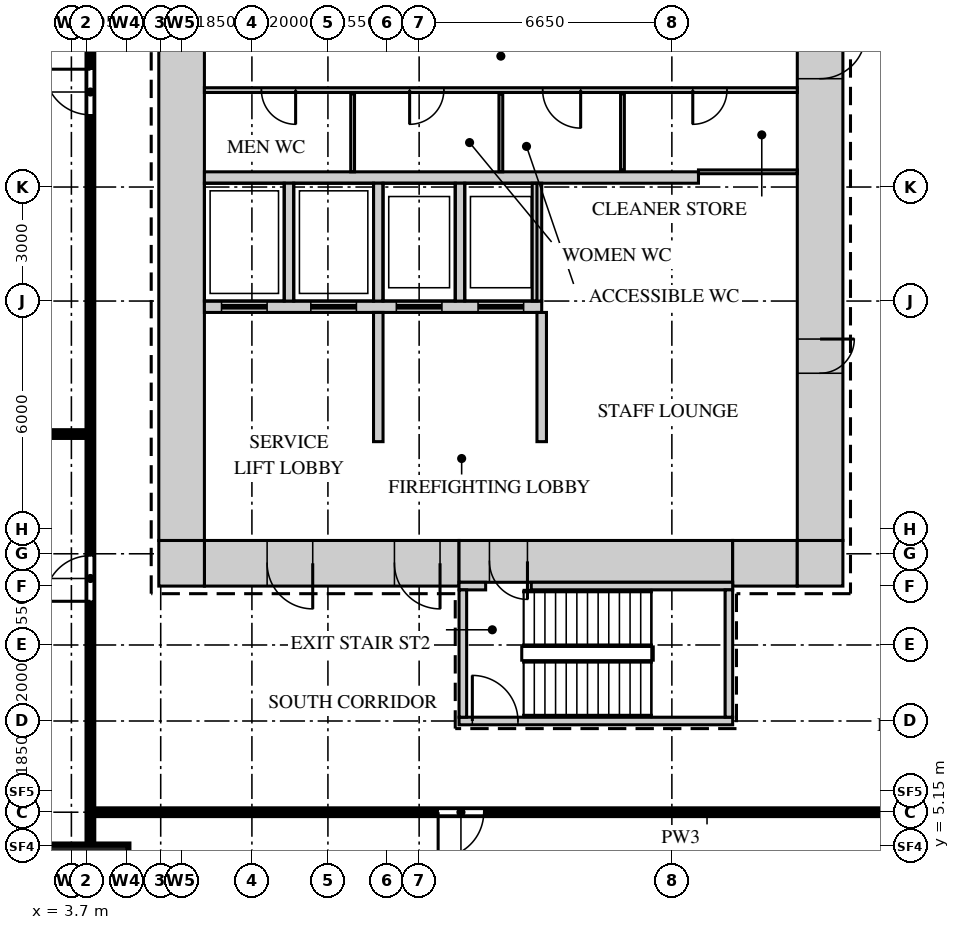
"""IFC4 building model, lengths in metres.
Left out: names, types, materials, properties, quantities, classifications, styles, units other than length and angle.
Written with IfcOpenShell. Run it as: python <this file> out.ifc"""

import sys

from ifc_helpers import new_model, si_unit, direction, frame, frame_2d, origin, origin_2d, place, context, subcontext, project, spatial, rectangle, extrude, source, transform, mapped, element, fill, save


model = new_model("IFC4")
c1 = context("Model", 3, precision=1e-05, world=origin(), true_north=direction((0.0, 1.0)))
c2 = subcontext(c1, "Body", "Model", "MODEL_VIEW")
j1 = project(units=[si_unit("LENGTHUNIT", "METRE"), si_unit("PLANEANGLEUNIT", "RADIAN")], contexts=[c1])
p1 = place(None, origin())
s1 = spatial("IfcSite", under=j1, at=p1, CompositionType="ELEMENT")
p2 = place(p1, origin())
s2 = spatial("IfcBuilding", under=s1, at=p2, CompositionType="ELEMENT")
p3 = place(p2, frame((0.0, 0.0, -9.0)))
s3 = spatial("IfcBuildingStorey", under=s2, at=p3, CompositionType="ELEMENT", Elevation=-9.0)
m1 = source(origin(), c2, "Body", "SweptSolid", [
    extrude(rectangle(XDim=6.7, YDim=1.2, at=frame_2d((3.35, 0.0))), origin(), (0.0, 0.0, 1.0), 4.2),
])
p4 = place(p3, frame((7.2, 12.6, 0.0), z_axis=(0.0, 0.0, 1.0), x_axis=(1.0, 0.0, 0.0)))
e1 = element("IfcWall", 1, at=p4, inside=s3, PredefinedType="SHEAR", context=c2, shape_type="MappedRepresentation", body=[
    mapped(m1, transform((0.0, 0.0, 0.0))),
])
m2 = source(origin(), c2, "Body", "SweptSolid", [
    extrude(rectangle(XDim=1.2, YDim=2.1, at=frame_2d((0.6, 1.05))), frame((0.0, 0.61, 0.0), z_axis=(0.0, -1.0, 0.0), x_axis=(1.0, 0.0, 0.0)), (0.0, 0.0, 1.0), 1.22),
])
p5 = place(p4, frame((5.0, 0.0, 0.0)))
e2 = element("IfcOpeningElement", 2, at=p5, cuts=e1, PredefinedType="OPENING", context=c2, shape_type="MappedRepresentation", body=[
    mapped(m2, transform((0.0, 0.0, 0.0))),
])
p6 = place(p4, frame((1.65, 0.0, 0.0)))
e3 = element("IfcOpeningElement", 3, at=p6, cuts=e1, PredefinedType="OPENING", context=c2, shape_type="MappedRepresentation", body=[
    mapped(m2, transform((0.0, 0.0, 0.0))),
])
m3 = source(origin(), c2, "Body", "SweptSolid", [
    extrude(rectangle(XDim=7.2, YDim=1.1, at=frame_2d((3.6, 0.0))), origin(), (0.0, 0.0, 1.0), 4.2),
])
p7 = place(p3, frame((13.9, 12.65, 0.0), z_axis=(0.0, 0.0, 1.0), x_axis=(1.0, 0.0, 0.0)))
e4 = element("IfcWall", 4, at=p7, inside=s3, PredefinedType="SHEAR", context=c2, shape_type="MappedRepresentation", body=[
    mapped(m3, transform((0.0, 0.0, 0.0))),
])
m4 = source(origin(), c2, "Body", "SweptSolid", [
    extrude(rectangle(XDim=1.0, YDim=2.1, at=frame_2d((0.5, 1.05))), frame((0.0, 0.56, 0.0), z_axis=(0.0, -1.0, 0.0), x_axis=(1.0, 0.0, 0.0)), (0.0, 0.0, 1.0), 1.12),
])
p8 = place(p7, frame((0.8, 0.0, 0.0)))
e5 = element("IfcOpeningElement", 5, at=p8, cuts=e4, PredefinedType="OPENING", context=c2, shape_type="MappedRepresentation", body=[
    mapped(m4, transform((0.0, 0.0, 0.0))),
])
m5 = source(origin(), c2, "Body", "SweptSolid", [
    extrude(rectangle(XDim=1.7, YDim=1.2, at=frame_2d((0.85, 0.0))), origin(), (0.0, 0.0, 1.0), 4.2),
])
p9 = place(p3, frame((21.1, 12.6, 0.0), z_axis=(0.0, 0.0, 1.0), x_axis=(1.0, 0.0, 0.0)))
e6 = element("IfcWall", 6, at=p9, inside=s3, PredefinedType="SHEAR", context=c2, shape_type="MappedRepresentation", body=[
    mapped(m5, transform((0.0, 0.0, 0.0))),
])
m6 = source(origin(), c2, "Body", "SweptSolid", [
    extrude(rectangle(XDim=1.2, YDim=1.2, at=frame_2d((0.6, 0.0))), origin(), (0.0, 0.0, 1.0), 4.2),
])
for number, where, z_axis, x_axis in (
    (7, (22.8, 12.6, 0.0), (0.0, 0.0, 1.0), (1.0, 0.0, 0.0)),
    (8, (6.0, 12.6, 0.0), (0.0, 0.0, 1.0), (1.0, 0.0, 0.0)),
):
    element("IfcWall", number, at=place(p3, frame(where, z_axis=z_axis, x_axis=x_axis)), inside=s3, PredefinedType="SHEAR", context=c2, shape_type="MappedRepresentation", body=[
        mapped(m6, transform((0.0, 0.0, 0.0))),
    ])
m7 = source(origin(), c2, "Body", "SweptSolid", [
    extrude(rectangle(XDim=27.6, YDim=1.2, at=frame_2d((13.8, 0.0))), origin(), (0.0, 0.0, 1.0), 4.2),
])
p10 = place(p3, frame((23.4, 13.2, 0.0), z_axis=(0.0, 0.0, 1.0), x_axis=(0.0, 1.0, 0.0)))
e9 = element("IfcWall", 9, at=p10, inside=s3, PredefinedType="SHEAR", context=c2, shape_type="MappedRepresentation", body=[
    mapped(m7, transform((0.0, 0.0, 0.0))),
])
p11 = place(p10, frame((12.15, 0.0, 0.0)))
e10 = element("IfcOpeningElement", 10, at=p11, cuts=e9, PredefinedType="OPENING", context=c2, shape_type="MappedRepresentation", body=[
    mapped(m2, transform((0.0, 0.0, 0.0))),
])
m8 = source(origin(), c2, "Body", "SweptSolid", [
    extrude(rectangle(XDim=0.9, YDim=2.1, at=frame_2d((0.45, 1.05))), frame((0.0, 0.61, 0.0), z_axis=(0.0, -1.0, 0.0), x_axis=(1.0, 0.0, 0.0)), (0.0, 0.0, 1.0), 1.22),
])
p12 = place(p10, frame((4.4, 0.0, 0.0)))
e11 = element("IfcOpeningElement", 11, at=p12, cuts=e9, PredefinedType="OPENING", context=c2, shape_type="MappedRepresentation", body=[
    mapped(m8, transform((0.0, 0.0, 0.0))),
])
p13 = place(p3, frame((6.6, 13.2, 0.0), z_axis=(0.0, 0.0, 1.0), x_axis=(0.0, 1.0, 0.0)))
e12 = element("IfcWall", 12, at=p13, inside=s3, PredefinedType="SHEAR", context=c2, shape_type="MappedRepresentation", body=[
    mapped(m7, transform((0.0, 0.0, 0.0))),
])
m9 = source(origin(), c2, "Body", "SweptSolid", [
    extrude(rectangle(XDim=0.7, YDim=0.2, at=frame_2d((0.35, 0.0))), origin(), (0.0, 0.0, 1.0), 4.2),
])
p14 = place(p3, frame((13.9, 12.0, 0.0), z_axis=(0.0, 0.0, 1.0), x_axis=(1.0, 0.0, 0.0)))
e13 = element("IfcWall", 13, at=p14, inside=s3, PredefinedType="SHEAR", context=c2, shape_type="MappedRepresentation", body=[
    mapped(m9, transform((0.0, 0.0, 0.0))),
])
m10 = source(origin(), c2, "Body", "SweptSolid", [
    extrude(rectangle(XDim=5.3, YDim=0.2, at=frame_2d((2.65, 0.0))), origin(), (0.0, 0.0, 1.0), 4.2),
])
p15 = place(p3, frame((15.8, 12.0, 0.0), z_axis=(0.0, 0.0, 1.0), x_axis=(1.0, 0.0, 0.0)))
e14 = element("IfcWall", 14, at=p15, inside=s3, PredefinedType="SHEAR", context=c2, shape_type="MappedRepresentation", body=[
    mapped(m10, transform((0.0, 0.0, 0.0))),
])
m11 = source(origin(), c2, "Body", "SweptSolid", [
    extrude(rectangle(XDim=7.2, YDim=0.2, at=frame_2d((3.6, 0.0))), origin(), (0.0, 0.0, 1.0), 4.2),
])
p16 = place(p3, frame((13.9, 8.45, 0.0), z_axis=(0.0, 0.0, 1.0), x_axis=(1.0, 0.0, 0.0)))
e15 = element("IfcWall", 15, at=p16, inside=s3, PredefinedType="SHEAR", context=c2, shape_type="MappedRepresentation", body=[
    mapped(m11, transform((0.0, 0.0, 0.0))),
])
m12 = source(origin(), c2, "Body", "SweptSolid", [
    extrude(rectangle(XDim=1.2, YDim=2.1, at=frame_2d((0.6, 1.05))), frame((0.0, 0.11, 0.0), z_axis=(0.0, -1.0, 0.0), x_axis=(1.0, 0.0, 0.0)), (0.0, 0.0, 1.0), 0.22),
])
p17 = place(p16, frame((0.35, 0.0, 0.0)))
e16 = element("IfcOpeningElement", 16, at=p17, cuts=e15, PredefinedType="OPENING", context=c2, shape_type="MappedRepresentation", body=[
    mapped(m12, transform((0.0, 0.0, 0.0))),
])
m13 = source(origin(), c2, "Body", "SweptSolid", [
    extrude(rectangle(XDim=3.35, YDim=0.2, at=frame_2d((1.675, 0.0))), origin(), (0.0, 0.0, 1.0), 4.2),
])
for number, where, z_axis, x_axis in (
    (17, (21.0, 8.55, 0.0), (0.0, 0.0, 1.0), (0.0, 1.0, 0.0)),
    (18, (14.0, 8.55, 0.0), (0.0, 0.0, 1.0), (0.0, 1.0, 0.0)),
):
    element("IfcWall", number, at=place(p3, frame(where, z_axis=z_axis, x_axis=x_axis)), inside=s3, PredefinedType="SHEAR", context=c2, shape_type="MappedRepresentation", body=[
        mapped(m13, transform((0.0, 0.0, 0.0))),
    ])
m14 = source(origin(), c2, "Body", "SweptSolid", [
    extrude(rectangle(XDim=13.0, YDim=0.3, at=frame_2d((6.5, 0.0))), origin(), (0.0, 0.0, 1.0), 4.2),
])
p18 = place(p3, frame((7.2, 22.75, 0.0), z_axis=(0.0, 0.0, 1.0), x_axis=(1.0, 0.0, 0.0)))
e19 = element("IfcWall", 19, at=p18, inside=s3, PredefinedType="STANDARD", context=c2, shape_type="MappedRepresentation", body=[
    mapped(m14, transform((0.0, 0.0, 0.0))),
])
m15 = source(origin(), c2, "Body", "SweptSolid", [
    extrude(rectangle(XDim=8.875, YDim=0.3, at=frame_2d((4.438, 0.0))), origin(), (0.0, 0.0, 1.0), 4.2),
])
p19 = place(p3, frame((7.2, 19.35, 0.0), z_axis=(0.0, 0.0, 1.0), x_axis=(1.0, 0.0, 0.0)))
e20 = element("IfcWall", 20, at=p19, inside=s3, PredefinedType="STANDARD", context=c2, shape_type="MappedRepresentation", body=[
    mapped(m15, transform((0.0, 0.0, 0.0))),
])
m16 = source(origin(), c2, "Body", "SweptSolid", [
    extrude(rectangle(XDim=1.2, YDim=2.1, at=frame_2d((0.6, 1.05))), frame((0.0, 0.16, 0.0), z_axis=(0.0, -1.0, 0.0), x_axis=(1.0, 0.0, 0.0)), (0.0, 0.0, 1.0), 0.32),
])
p20 = place(p19, frame((0.45, 0.0, 0.0)))
e21 = element("IfcOpeningElement", 21, at=p20, cuts=e20, PredefinedType="OPENING", context=c2, shape_type="MappedRepresentation", body=[
    mapped(m16, transform((0.0, 0.0, 0.0))),
])
p21 = place(p19, frame((2.8, 0.0, 0.0)))
e22 = element("IfcOpeningElement", 22, at=p21, cuts=e20, PredefinedType="OPENING", context=c2, shape_type="MappedRepresentation", body=[
    mapped(m16, transform((0.0, 0.0, 0.0))),
])
p22 = place(p19, frame((5.05, 0.0, 0.0)))
e23 = element("IfcOpeningElement", 23, at=p22, cuts=e20, PredefinedType="OPENING", context=c2, shape_type="MappedRepresentation", body=[
    mapped(m16, transform((0.0, 0.0, 0.0))),
])
p23 = place(p19, frame((7.2, 0.0, 0.0)))
e24 = element("IfcOpeningElement", 24, at=p23, cuts=e20, PredefinedType="OPENING", context=c2, shape_type="MappedRepresentation", body=[
    mapped(m16, transform((0.0, 0.0, 0.0))),
])
m17 = source(origin(), c2, "Body", "SweptSolid", [
    extrude(rectangle(XDim=3.1, YDim=0.25, at=frame_2d((1.55, 0.0))), origin(), (0.0, 0.0, 1.0), 4.2),
])
for number, where, z_axis, x_axis in (
    (25, (9.425, 19.5, 0.0), (0.0, 0.0, 1.0), (0.0, 1.0, 0.0)),
    (26, (11.775, 19.5, 0.0), (0.0, 0.0, 1.0), (0.0, 1.0, 0.0)),
    (27, (13.925, 19.5, 0.0), (0.0, 0.0, 1.0), (0.0, 1.0, 0.0)),
    (28, (15.95, 19.5, 0.0), (0.0, 0.0, 1.0), (0.0, 1.0, 0.0)),
):
    element("IfcWall", number, at=place(p3, frame(where, z_axis=z_axis, x_axis=x_axis)), inside=s3, PredefinedType="STANDARD", context=c2, shape_type="MappedRepresentation", body=[
        mapped(m17, transform((0.0, 0.0, 0.0))),
    ])
m18 = source(origin(), c2, "Body", "SweptSolid", [
    extrude(rectangle(XDim=3.4, YDim=0.25, at=frame_2d((1.7, 0.0))), origin(), (0.0, 0.0, 1.0), 4.2),
])
for number, where, z_axis, x_axis in (
    (29, (16.075, 15.8, 0.0), (0.0, 0.0, 1.0), (0.0, 1.0, 0.0)),
    (30, (11.775, 15.8, 0.0), (0.0, 0.0, 1.0), (0.0, 1.0, 0.0)),
):
    element("IfcWall", number, at=place(p3, frame(where, z_axis=z_axis, x_axis=x_axis)), inside=s3, PredefinedType="STANDARD", context=c2, shape_type="MappedRepresentation", body=[
        mapped(m18, transform((0.0, 0.0, 0.0))),
    ])
m19 = source(origin(), c2, "Body", "SweptSolid", [
    extrude(rectangle(XDim=2.2, YDim=2.2, at=origin_2d()), origin(), (0.0, 0.0, 1.0), 4.5),
])
p24 = place(p3, frame((4.1, 4.1, 0.0), z_axis=(0.0, 0.0, 1.0), x_axis=(1.0, 0.0, 0.0)))
e31 = element("IfcColumn", 31, at=p24, inside=s3, PredefinedType="COLUMN", context=c2, shape_type="MappedRepresentation", body=[
    mapped(m19, transform((0.0, 0.0, 0.0))),
])
m20 = source(origin(), c2, "Body", "SweptSolid", [
    extrude(rectangle(XDim=53.0, YDim=0.15, at=frame_2d((26.5, 0.0))), origin(), (0.0, 0.0, 1.0), 4.2),
])
p25 = place(p3, frame((4.2, 0.5, 0.0), z_axis=(0.0, 0.0, 1.0), x_axis=(0.0, 1.0, 0.0)))
e32 = element("IfcWall", 32, at=p25, inside=s3, PredefinedType="PARTITIONING", context=c2, shape_type="MappedRepresentation", body=[
    mapped(m20, transform((0.0, 0.0, 0.0))),
])
m21 = source(origin(), c2, "Body", "SweptSolid", [
    extrude(rectangle(XDim=1.2, YDim=2.1, at=frame_2d((0.6, 1.05))), frame((0.0, 0.085, 0.0), z_axis=(0.0, -1.0, 0.0), x_axis=(1.0, 0.0, 0.0)), (0.0, 0.0, 1.0), 0.17),
])
p26 = place(p25, frame((11.1, 0.0, 0.0)))
e33 = element("IfcOpeningElement", 33, at=p26, cuts=e32, PredefinedType="OPENING", context=c2, shape_type="MappedRepresentation", body=[
    mapped(m21, transform((0.0, 0.0, 0.0))),
])
p27 = place(p25, frame((23.9, 0.0, 0.0)))
e34 = element("IfcOpeningElement", 34, at=p27, cuts=e32, PredefinedType="OPENING", context=c2, shape_type="MappedRepresentation", body=[
    mapped(m21, transform((0.0, 0.0, 0.0))),
])
p28 = place(p25, frame((38.7, 0.0, 0.0)))
e35 = element("IfcOpeningElement", 35, at=p28, cuts=e32, PredefinedType="OPENING", context=c2, shape_type="MappedRepresentation", body=[
    mapped(m21, transform((0.0, 0.0, 0.0))),
])
m22 = source(origin(), c2, "Body", "SweptSolid", [
    extrude(rectangle(XDim=22.0, YDim=0.15, at=frame_2d((11.0, 0.0))), origin(), (0.0, 0.0, 1.0), 4.2),
])
p29 = place(p3, frame((4.3, 6.05, 0.0), z_axis=(0.0, 0.0, 1.0), x_axis=(1.0, 0.0, 0.0)))
e36 = element("IfcWall", 36, at=p29, inside=s3, PredefinedType="PARTITIONING", context=c2, shape_type="MappedRepresentation", body=[
    mapped(m22, transform((0.0, 0.0, 0.0))),
])
p30 = place(p29, frame((9.05, 0.0, 0.0)))
e37 = element("IfcOpeningElement", 37, at=p30, cuts=e36, PredefinedType="OPENING", context=c2, shape_type="MappedRepresentation", body=[
    mapped(m21, transform((0.0, 0.0, 0.0))),
])
m23 = source(origin(), c2, "Body", "SweptSolid", [
    extrude(rectangle(XDim=12.6, YDim=0.15, at=frame_2d((6.3, 0.0))), origin(), (0.0, 0.0, 1.0), 4.2),
])
p31 = place(p3, frame((-8.5, 16.0, 0.0), z_axis=(0.0, 0.0, 1.0), x_axis=(1.0, 0.0, 0.0)))
e38 = element("IfcWall", 38, at=p31, inside=s3, PredefinedType="PARTITIONING", context=c2, shape_type="MappedRepresentation", body=[
    mapped(m23, transform((0.0, 0.0, 0.0))),
])
m24 = source(origin(), c2, "Body", "SweptSolid", [
    extrude(rectangle(XDim=2.05, YDim=0.1, at=frame_2d((1.025, 0.0))), origin(), (0.0, 0.0, 1.0), 4.2),
])
for number, where, z_axis, x_axis in (
    (39, (11.1, 22.9, 0.0), (0.0, 0.0, 1.0), (0.0, 1.0, 0.0)),
    (40, (15.0, 22.9, 0.0), (0.0, 0.0, 1.0), (0.0, 1.0, 0.0)),
):
    element("IfcWall", number, at=place(p3, frame(where, z_axis=z_axis, x_axis=x_axis)), inside=s3, PredefinedType="PARTITIONING", context=c2, shape_type="MappedRepresentation", body=[
        mapped(m24, transform((0.0, 0.0, 0.0))),
    ])
m25 = source(origin(), c2, "Body", "SweptSolid", [
    extrude(rectangle(XDim=2.6, YDim=0.1, at=frame_2d((1.3, 0.0))), origin(), (0.0, 0.0, 1.0), 4.2),
])
p32 = place(p3, frame((20.2, 22.9, 0.0), z_axis=(0.0, 0.0, 1.0), x_axis=(1.0, 0.0, 0.0)))
e41 = element("IfcWall", 41, at=p32, inside=s3, PredefinedType="PARTITIONING", context=c2, shape_type="MappedRepresentation", body=[
    mapped(m25, transform((0.0, 0.0, 0.0))),
])
m26 = source(origin(), c2, "Body", "SweptSolid", [
    extrude(rectangle(XDim=2.0, YDim=0.1, at=frame_2d((1.0, 0.0))), origin(), (0.0, 0.0, 1.0), 4.2),
])
p33 = place(p3, frame((18.2, 22.95, 0.0), z_axis=(0.0, 0.0, 1.0), x_axis=(0.0, 1.0, 0.0)))
e42 = element("IfcWall", 42, at=p33, inside=s3, PredefinedType="PARTITIONING", context=c2, shape_type="MappedRepresentation", body=[
    mapped(m26, transform((0.0, 0.0, 0.0))),
])
m27 = source(origin(), c2, "Body", "SweptSolid", [
    extrude(rectangle(XDim=15.6, YDim=0.125, at=frame_2d((7.8, 0.0))), origin(), (0.0, 0.0, 1.0), 4.2),
])
p34 = place(p3, frame((7.2, 25.05, 0.0), z_axis=(0.0, 0.0, 1.0), x_axis=(1.0, 0.0, 0.0)))
e43 = element("IfcWall", 43, at=p34, inside=s3, PredefinedType="PARTITIONING", context=c2, shape_type="MappedRepresentation", body=[
    mapped(m27, transform((0.0, 0.0, 0.0))),
])
m28 = source(origin(), c2, "Body", "SweptSolid", [
    extrude(rectangle(XDim=0.9, YDim=2.1, at=frame_2d((0.45, 1.05))), frame((0.0, 0.073, 0.0), z_axis=(0.0, -1.0, 0.0), x_axis=(1.0, 0.0, 0.0)), (0.0, 0.0, 1.0), 0.145),
])
p35 = place(p34, frame((1.5, 0.0, 0.0)))
e44 = element("IfcOpeningElement", 44, at=p35, cuts=e43, PredefinedType="OPENING", context=c2, shape_type="MappedRepresentation", body=[
    mapped(m28, transform((0.0, 0.0, 0.0))),
])
p36 = place(p34, frame((5.4, 0.0, 0.0)))
e45 = element("IfcOpeningElement", 45, at=p36, cuts=e43, PredefinedType="OPENING", context=c2, shape_type="MappedRepresentation", body=[
    mapped(m28, transform((0.0, 0.0, 0.0))),
])
m29 = source(origin(), c2, "Body", "SweptSolid", [
    extrude(rectangle(XDim=1.0, YDim=2.1, at=frame_2d((0.5, 1.05))), frame((0.0, 0.073, 0.0), z_axis=(0.0, -1.0, 0.0), x_axis=(1.0, 0.0, 0.0)), (0.0, 0.0, 1.0), 0.145),
])
p37 = place(p34, frame((8.9, 0.0, 0.0)))
e46 = element("IfcOpeningElement", 46, at=p37, cuts=e43, PredefinedType="OPENING", context=c2, shape_type="MappedRepresentation", body=[
    mapped(m29, transform((0.0, 0.0, 0.0))),
])
p38 = place(p34, frame((12.85, 0.0, 0.0)))
e47 = element("IfcOpeningElement", 47, at=p38, cuts=e43, PredefinedType="OPENING", context=c2, shape_type="MappedRepresentation", body=[
    mapped(m28, transform((0.0, 0.0, 0.0))),
])
m30 = source(origin(), c2, "Body", "SweptSolid", [
    extrude(rectangle(XDim=1.2, YDim=2.1, at=frame_2d((0.6, 1.05))), frame((0.0, 0.55, 0.0), z_axis=(0.0, -1.0, 0.0), x_axis=(1.0, 0.0, 0.0)), (0.0, 0.0, 1.0), 1.1),
])
p39 = place(p11, origin())
e48 = element("IfcDoor", 48, at=p39, inside=s3, OperationType="SINGLE_SWING_RIGHT", PredefinedType="DOOR", context=c2, shape_type="MappedRepresentation", body=[
    mapped(m30, transform((0.0, 0.0, 0.0))),
])
fill(e10, e48)
m31 = source(origin(), c2, "Body", "SweptSolid", [
    extrude(rectangle(XDim=0.9, YDim=2.1, at=frame_2d((0.45, 1.05))), frame((0.0, 0.025, 0.0), z_axis=(0.0, -1.0, 0.0), x_axis=(1.0, 0.0, 0.0)), (0.0, 0.0, 1.0), 0.05),
])
p40 = place(p35, origin())
e49 = element("IfcDoor", 49, at=p40, inside=s3, OperationType="SINGLE_SWING_RIGHT", PredefinedType="DOOR", context=c2, shape_type="MappedRepresentation", body=[
    mapped(m31, transform((0.0, 0.0, 0.0))),
])
fill(e44, e49)
p41 = place(p36, origin())
e50 = element("IfcDoor", 50, at=p41, inside=s3, OperationType="SINGLE_SWING_LEFT", PredefinedType="DOOR", context=c2, shape_type="MappedRepresentation", body=[
    mapped(m31, transform((0.0, 0.0, 0.0))),
])
fill(e45, e50)
m32 = source(origin(), c2, "Body", "SweptSolid", [
    extrude(rectangle(XDim=1.0, YDim=2.1, at=frame_2d((0.5, 1.05))), frame((0.0, 0.025, 0.0), z_axis=(0.0, -1.0, 0.0), x_axis=(1.0, 0.0, 0.0)), (0.0, 0.0, 1.0), 0.05),
])
p42 = place(p37, origin())
e51 = element("IfcDoor", 51, at=p42, inside=s3, OperationType="SINGLE_SWING_RIGHT", PredefinedType="DOOR", context=c2, shape_type="MappedRepresentation", body=[
    mapped(m32, transform((0.0, 0.0, 0.0))),
])
fill(e46, e51)
p43 = place(p38, origin())
e52 = element("IfcDoor", 52, at=p43, inside=s3, OperationType="SINGLE_SWING_LEFT", PredefinedType="DOOR", context=c2, shape_type="MappedRepresentation", body=[
    mapped(m31, transform((0.0, 0.0, 0.0))),
])
fill(e47, e52)
m33 = source(origin(), c2, "Body", "SweptSolid", [
    extrude(rectangle(XDim=0.9, YDim=2.1, at=frame_2d((0.45, 1.05))), frame((0.0, 0.55, 0.0), z_axis=(0.0, -1.0, 0.0), x_axis=(1.0, 0.0, 0.0)), (0.0, 0.0, 1.0), 1.1),
])
p44 = place(p12, origin())
e53 = element("IfcDoor", 53, at=p44, inside=s3, OperationType="SINGLE_SWING_RIGHT", PredefinedType="DOOR", context=c2, shape_type="MappedRepresentation", body=[
    mapped(m33, transform((0.0, 0.0, 0.0))),
])
fill(e11, e53)
p45 = place(p5, origin())
e54 = element("IfcDoor", 54, at=p45, inside=s3, OperationType="SINGLE_SWING_RIGHT", PredefinedType="DOOR", context=c2, shape_type="MappedRepresentation", body=[
    mapped(m30, transform((0.0, 0.0, 0.0))),
])
fill(e2, e54)
p46 = place(p6, origin())
e55 = element("IfcDoor", 55, at=p46, inside=s3, OperationType="SINGLE_SWING_RIGHT", PredefinedType="DOOR", context=c2, shape_type="MappedRepresentation", body=[
    mapped(m30, transform((0.0, 0.0, 0.0))),
])
fill(e3, e55)
m34 = source(origin(), c2, "Body", "SweptSolid", [
    extrude(rectangle(XDim=1.0, YDim=2.1, at=frame_2d((0.5, 1.05))), frame((0.0, 0.5, 0.0), z_axis=(0.0, -1.0, 0.0), x_axis=(1.0, 0.0, 0.0)), (0.0, 0.0, 1.0), 1.0),
])
p47 = place(p8, origin())
e56 = element("IfcDoor", 56, at=p47, inside=s3, OperationType="SINGLE_SWING_RIGHT", PredefinedType="DOOR", context=c2, shape_type="MappedRepresentation", body=[
    mapped(m34, transform((0.0, 0.0, 0.0))),
])
fill(e5, e56)
m35 = source(origin(), c2, "Body", "SweptSolid", [
    extrude(rectangle(XDim=1.2, YDim=2.1, at=frame_2d((0.6, 1.05))), frame((0.0, 0.025, 0.0), z_axis=(0.0, -1.0, 0.0), x_axis=(1.0, 0.0, 0.0)), (0.0, 0.0, 1.0), 0.05),
])
p48 = place(p26, origin())
e57 = element("IfcDoor", 57, at=p48, inside=s3, OperationType="SINGLE_SWING_RIGHT", PredefinedType="DOOR", context=c2, shape_type="MappedRepresentation", body=[
    mapped(m35, transform((0.0, 0.0, 0.0))),
])
fill(e33, e57)
p49 = place(p27, origin())
e58 = element("IfcDoor", 58, at=p49, inside=s3, OperationType="SINGLE_SWING_LEFT", PredefinedType="DOOR", context=c2, shape_type="MappedRepresentation", body=[
    mapped(m35, transform((0.0, 0.0, 0.0))),
])
fill(e34, e58)
p50 = place(p30, origin())
e59 = element("IfcDoor", 59, at=p50, inside=s3, OperationType="SINGLE_SWING_LEFT", PredefinedType="DOOR", context=c2, shape_type="MappedRepresentation", body=[
    mapped(m35, transform((0.0, 0.0, 0.0))),
])
fill(e37, e59)
p51 = place(p17, origin())
e60 = element("IfcDoor", 60, at=p51, inside=s3, OperationType="SINGLE_SWING_RIGHT", PredefinedType="DOOR", context=c2, shape_type="MappedRepresentation", body=[
    mapped(m35, transform((0.0, 0.0, 0.0))),
])
fill(e16, e60)
p52 = place(p20, origin())
e61 = element("IfcDoor", 61, at=p52, inside=s3, OperationType="DOUBLE_DOOR_SLIDING", PredefinedType="DOOR", context=c2, shape_type="MappedRepresentation", body=[
    mapped(m35, transform((0.0, 0.0, 0.0))),
])
fill(e21, e61)
p53 = place(p21, origin())
e62 = element("IfcDoor", 62, at=p53, inside=s3, OperationType="DOUBLE_DOOR_SLIDING", PredefinedType="DOOR", context=c2, shape_type="MappedRepresentation", body=[
    mapped(m35, transform((0.0, 0.0, 0.0))),
])
fill(e22, e62)
p54 = place(p22, origin())
e63 = element("IfcDoor", 63, at=p54, inside=s3, OperationType="DOUBLE_DOOR_SLIDING", PredefinedType="DOOR", context=c2, shape_type="MappedRepresentation", body=[
    mapped(m35, transform((0.0, 0.0, 0.0))),
])
fill(e23, e63)
p55 = place(p23, origin())
e64 = element("IfcDoor", 64, at=p55, inside=s3, OperationType="DOUBLE_DOOR_SLIDING", PredefinedType="DOOR", context=c2, shape_type="MappedRepresentation", body=[
    mapped(m35, transform((0.0, 0.0, 0.0))),
])
fill(e24, e64)
save(model, sys.argv[1])
